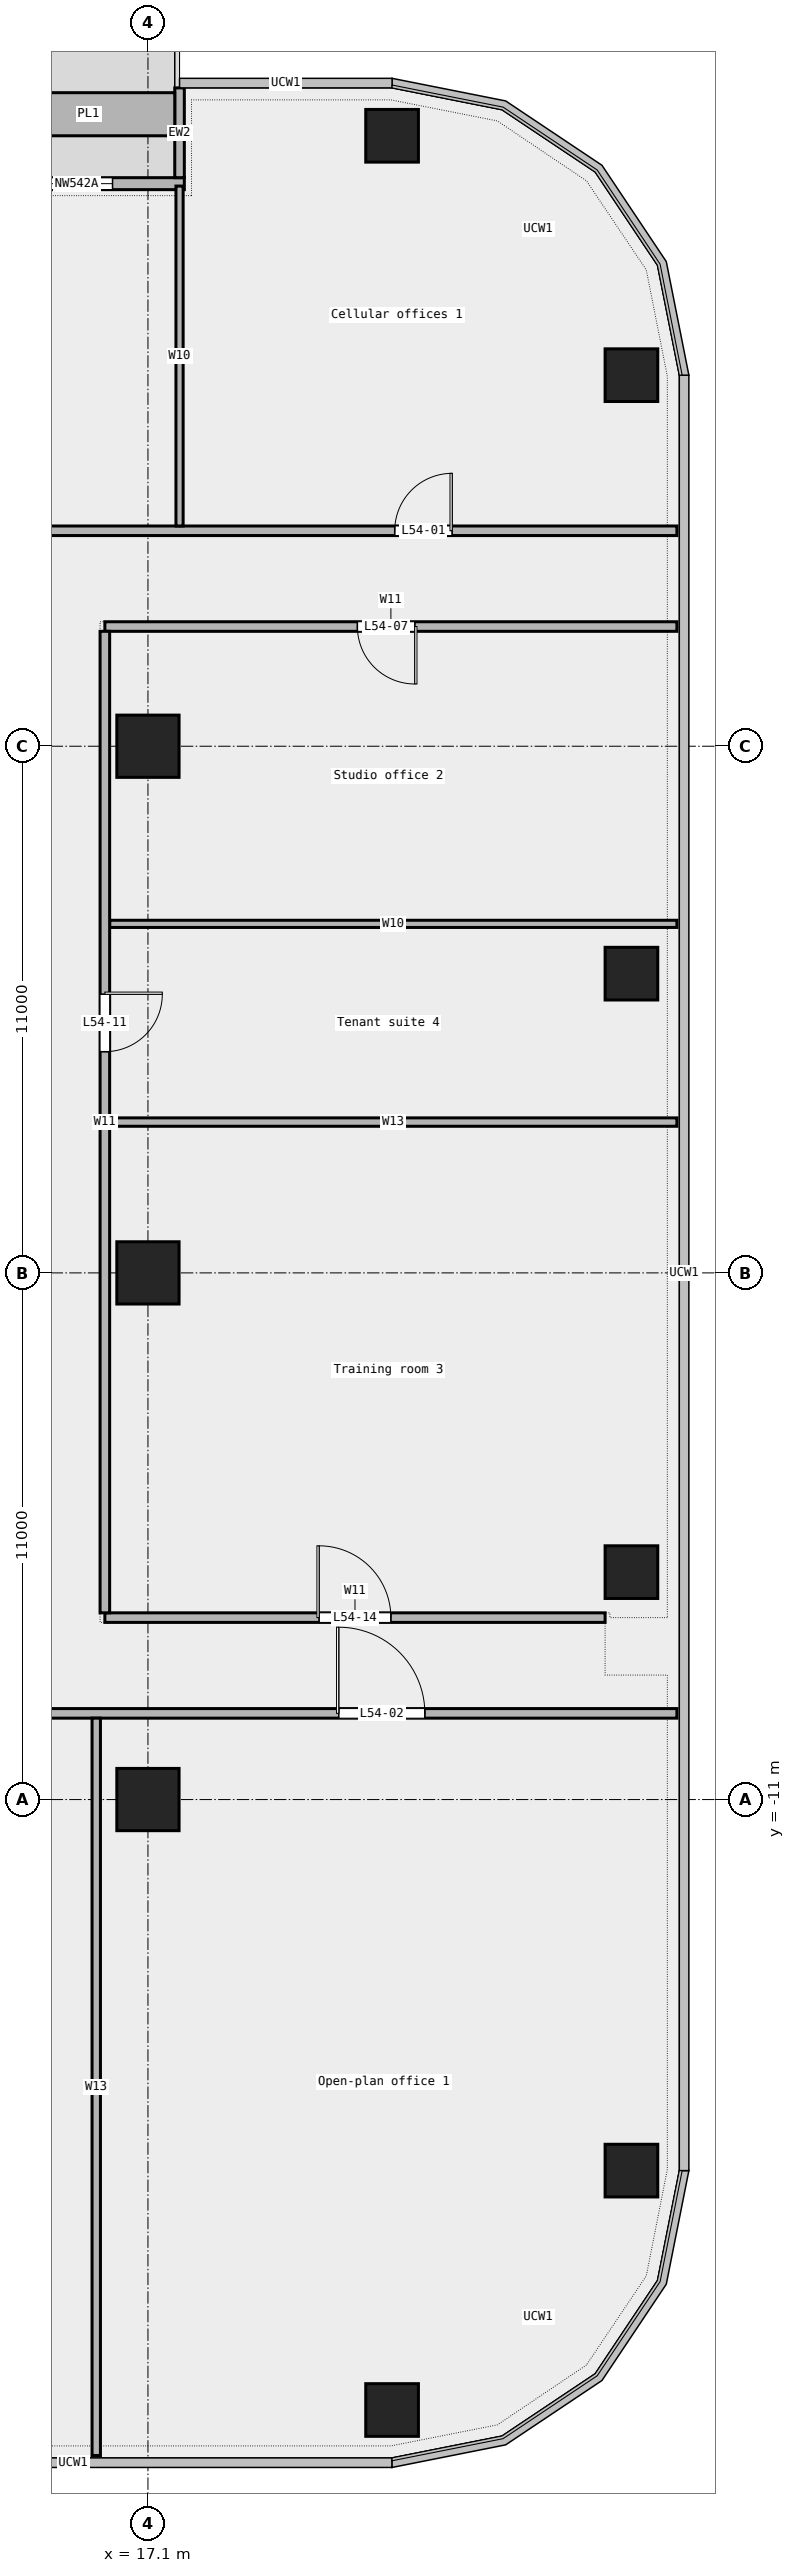
"""IFC4 building model, lengths in metres.
Left out: names, types, materials, properties, quantities, classifications, styles, units other than length and angle.
Written with IfcOpenShell. Run it as: python <this file> out.ifc"""

import sys

from ifc_helpers import new_model, si_unit, direction, frame, frame_2d, origin, origin_2d, place, context, subcontext, project, spatial, rectangle, extrude, element, fill, save


model = new_model("IFC4")
c1 = context("Model", 3, precision=1e-05, world=origin(), true_north=direction((0.0, 1.0)))
c2 = subcontext(c1, "Body", "Model", "MODEL_VIEW")
j1 = project(units=[si_unit("LENGTHUNIT", "METRE"), si_unit("PLANEANGLEUNIT", "RADIAN")], contexts=[c1])
p1 = place(None, origin())
s1 = spatial("IfcSite", under=j1, at=p1, CompositionType="ELEMENT")
p2 = place(p1, origin())
s2 = spatial("IfcBuilding", under=s1, at=p2, CompositionType="ELEMENT")
p3 = place(p2, frame((0.0, 0.0, 251.0)))
s3 = spatial("IfcBuildingStorey", under=s2, at=p3, CompositionType="ELEMENT", Elevation=251.0)
for number, where, z_axis, x_axis in (
    (1, (22.2, -23.75, 0.0), (0.0, 0.0, 1.0), (1.0, 0.0, 0.0)),
    (2, (27.2, -18.75, 0.0), (0.0, 0.0, 1.0), (1.0, 0.0, 0.0)),
    (3, (27.2, -6.25, 0.0), (0.0, 0.0, 1.0), (1.0, 0.0, 0.0)),
    (4, (27.2, 6.25, 0.0), (0.0, 0.0, 1.0), (1.0, 0.0, 0.0)),
    (5, (27.2, 18.75, 0.0), (0.0, 0.0, 1.0), (1.0, 0.0, 0.0)),
    (6, (22.2, 23.75, 0.0), (0.0, 0.0, 1.0), (1.0, 0.0, 0.0)),
):
    element("IfcColumn", number, at=place(p3, frame(where, z_axis=z_axis, x_axis=x_axis)), inside=s3, PredefinedType="COLUMN", context=c2, shape_type="SweptSolid", body=[
        extrude(rectangle(XDim=1.1, YDim=1.1, at=origin_2d()), origin(), (0.0, 0.0, 1.0), 3.6),
    ])
for number, where, z_axis, x_axis in (
    (7, (17.1, -11.0, 0.0), (0.0, 0.0, 1.0), (1.0, 0.0, 0.0)),
    (8, (17.1, 0.0, 0.0), (0.0, 0.0, 1.0), (1.0, 0.0, 0.0)),
    (9, (17.1, 11.0, 0.0), (0.0, 0.0, 1.0), (1.0, 0.0, 0.0)),
):
    element("IfcColumn", number, at=place(p3, frame(where, z_axis=z_axis, x_axis=x_axis)), inside=s3, PredefinedType="COLUMN", context=c2, shape_type="SweptSolid", body=[
        extrude(rectangle(XDim=1.3, YDim=1.3, at=origin_2d()), origin(), (0.0, 0.0, 1.0), 3.6),
    ])
p4 = place(p3, frame((17.86, 22.75, 0.0), z_axis=(0.0, 0.0, 1.0), x_axis=(-1.0, 0.0, 0.0)))
e10 = element("IfcWall", 10, at=p4, inside=s3, PredefinedType="STANDARD", context=c2, shape_type="SweptSolid", body=[
    extrude(rectangle(XDim=13.52, YDim=0.25, at=frame_2d((6.76, 0.0))), origin(), (0.0, 0.0, 1.0), 3.6),
])
p5 = place(p4, frame((1.5, 0.0, 0.45)))
e11 = element("IfcOpeningElement", 11, at=p5, cuts=e10, PredefinedType="OPENING", context=c2, shape_type="SweptSolid", body=[
    extrude(rectangle(XDim=1.5, YDim=2.4, at=frame_2d((0.75, 1.2))), frame((0.0, 0.137, 0.0), z_axis=(0.0, -1.0, 0.0), x_axis=(1.0, 0.0, 0.0)), (0.0, 0.0, 1.0), 0.274),
])
p6 = place(p4, frame((4.0, 0.0, 0.0)))
e12 = element("IfcOpeningElement", 12, at=p6, cuts=e10, PredefinedType="OPENING", context=c2, shape_type="SweptSolid", body=[
    extrude(rectangle(XDim=1.8, YDim=2.4, at=frame_2d((0.9, 1.2))), frame((0.0, 0.137, 0.0), z_axis=(0.0, -1.0, 0.0), x_axis=(1.0, 0.0, 0.0)), (0.0, 0.0, 1.0), 0.274),
])
p7 = place(p4, frame((10.5, 0.0, 0.45)))
e13 = element("IfcOpeningElement", 13, at=p7, cuts=e10, PredefinedType="OPENING", context=c2, shape_type="SweptSolid", body=[
    extrude(rectangle(XDim=1.5, YDim=2.4, at=frame_2d((0.75, 1.2))), frame((0.0, 0.137, 0.0), z_axis=(0.0, -1.0, 0.0), x_axis=(1.0, 0.0, 0.0)), (0.0, 0.0, 1.0), 0.274),
])
p8 = place(p3, frame((17.76, 24.75, 0.0), z_axis=(0.0, 0.0, 1.0), x_axis=(0.0, -1.0, 0.0)))
e14 = element("IfcWall", 14, at=p8, inside=s3, PredefinedType="STANDARD", context=c2, shape_type="SweptSolid", body=[
    extrude(rectangle(XDim=1.875, YDim=0.2, at=frame_2d((0.938, 0.0))), origin(), (0.0, 0.0, 1.0), 3.6),
])
p9 = place(p3, frame((17.66, 24.2, 0.0), z_axis=(0.0, 0.0, 1.0), x_axis=(-1.0, 0.0, 0.0)))
e15 = element("IfcWall", 15, at=p9, inside=s3, PredefinedType="STANDARD", context=c2, shape_type="SweptSolid", body=[
    extrude(rectangle(XDim=3.6, YDim=0.9, at=frame_2d((1.8, 0.0))), origin(), (0.0, 0.0, 1.0), 0.7),
])
p10 = place(p3, frame((-4.44, -9.2, 0.0), z_axis=(0.0, 0.0, 1.0), x_axis=(1.0, 0.0, 0.0)))
e16 = element("IfcWall", 16, at=p10, inside=s3, PredefinedType="PARTITIONING", context=c2, shape_type="SweptSolid", body=[
    extrude(rectangle(XDim=32.59, YDim=0.2, at=frame_2d((16.295, 0.0))), origin(), (0.0, 0.0, 1.0), 3.6),
])
p11 = place(p10, frame((25.525, 0.0, 0.0)))
e17 = element("IfcOpeningElement", 17, at=p11, cuts=e16, PredefinedType="OPENING", context=c2, shape_type="SweptSolid", body=[
    extrude(rectangle(XDim=1.8, YDim=2.1, at=frame_2d((0.9, 1.05))), frame((0.0, 0.112, 0.0), z_axis=(0.0, -1.0, 0.0), x_axis=(1.0, 0.0, 0.0)), (0.0, 0.0, 1.0), 0.224),
])
p12 = place(p10, frame((5.76, 0.0, 0.0)))
e18 = element("IfcOpeningElement", 18, at=p12, cuts=e16, PredefinedType="OPENING", context=c2, shape_type="SweptSolid", body=[
    extrude(rectangle(XDim=1.8, YDim=2.1, at=frame_2d((0.9, 1.05))), frame((0.0, 0.112, 0.0), z_axis=(0.0, -1.0, 0.0), x_axis=(1.0, 0.0, 0.0)), (0.0, 0.0, 1.0), 0.224),
])
p13 = place(p10, frame((16.14, 0.0, 0.0)))
e19 = element("IfcOpeningElement", 19, at=p13, cuts=e16, PredefinedType="OPENING", context=c2, shape_type="SweptSolid", body=[
    extrude(rectangle(XDim=1.5, YDim=2.1, at=frame_2d((0.75, 1.05))), frame((0.0, 0.112, 0.0), z_axis=(0.0, -1.0, 0.0), x_axis=(1.0, 0.0, 0.0)), (0.0, 0.0, 1.0), 0.224),
])
p14 = place(p3, frame((16.2, -7.2, 0.0), z_axis=(0.0, 0.0, 1.0), x_axis=(1.0, 0.0, 0.0)))
e20 = element("IfcWall", 20, at=p14, inside=s3, PredefinedType="PARTITIONING", context=c2, shape_type="SweptSolid", body=[
    extrude(rectangle(XDim=10.45, YDim=0.2, at=frame_2d((5.225, 0.0))), origin(), (0.0, 0.0, 1.0), 3.6),
])
p15 = place(p14, frame((4.475, 0.0, 0.0)))
e21 = element("IfcOpeningElement", 21, at=p15, cuts=e20, PredefinedType="OPENING", context=c2, shape_type="SweptSolid", body=[
    extrude(rectangle(XDim=1.5, YDim=2.1, at=frame_2d((0.75, 1.05))), frame((0.0, 0.112, 0.0), z_axis=(0.0, -1.0, 0.0), x_axis=(1.0, 0.0, 0.0)), (0.0, 0.0, 1.0), 0.224),
])
p16 = place(p3, frame((16.3, 3.15, 0.0), z_axis=(0.0, 0.0, 1.0), x_axis=(1.0, 0.0, 0.0)))
e22 = element("IfcWall", 22, at=p16, inside=s3, PredefinedType="PARTITIONING", context=c2, shape_type="SweptSolid", body=[
    extrude(rectangle(XDim=11.85, YDim=0.175, at=frame_2d((5.925, 0.0))), origin(), (0.0, 0.0, 1.0), 3.6),
])
p17 = place(p3, frame((16.3, 7.29, 0.0), z_axis=(0.0, 0.0, 1.0), x_axis=(1.0, 0.0, 0.0)))
e23 = element("IfcWall", 23, at=p17, inside=s3, PredefinedType="PARTITIONING", context=c2, shape_type="SweptSolid", body=[
    extrude(rectangle(XDim=11.85, YDim=0.15, at=frame_2d((5.925, 0.0))), origin(), (0.0, 0.0, 1.0), 3.6),
])
p18 = place(p3, frame((16.2, 13.5, 0.0), z_axis=(0.0, 0.0, 1.0), x_axis=(1.0, 0.0, 0.0)))
e24 = element("IfcWall", 24, at=p18, inside=s3, PredefinedType="PARTITIONING", context=c2, shape_type="SweptSolid", body=[
    extrude(rectangle(XDim=11.95, YDim=0.2, at=frame_2d((5.975, 0.0))), origin(), (0.0, 0.0, 1.0), 3.6),
])
p19 = place(p18, frame((5.275, 0.0, 0.0)))
e25 = element("IfcOpeningElement", 25, at=p19, cuts=e24, PredefinedType="OPENING", context=c2, shape_type="SweptSolid", body=[
    extrude(rectangle(XDim=1.2, YDim=2.1, at=frame_2d((0.6, 1.05))), frame((0.0, 0.112, 0.0), z_axis=(0.0, -1.0, 0.0), x_axis=(1.0, 0.0, 0.0)), (0.0, 0.0, 1.0), 0.224),
])
p20 = place(p3, frame((-28.15, 15.5, 0.0), z_axis=(0.0, 0.0, 1.0), x_axis=(1.0, 0.0, 0.0)))
e26 = element("IfcWall", 26, at=p20, inside=s3, PredefinedType="PARTITIONING", context=c2, shape_type="SweptSolid", body=[
    extrude(rectangle(XDim=56.3, YDim=0.2, at=frame_2d((28.15, 0.0))), origin(), (0.0, 0.0, 1.0), 3.6),
])
p21 = place(p20, frame((50.405, 0.0, 0.0)))
e27 = element("IfcOpeningElement", 27, at=p21, cuts=e26, PredefinedType="OPENING", context=c2, shape_type="SweptSolid", body=[
    extrude(rectangle(XDim=1.2, YDim=2.1, at=frame_2d((0.6, 1.05))), frame((0.0, 0.112, 0.0), z_axis=(0.0, -1.0, 0.0), x_axis=(1.0, 0.0, 0.0)), (0.0, 0.0, 1.0), 0.224),
])
p22 = place(p20, frame((38.5, 0.0, 0.0)))
e28 = element("IfcOpeningElement", 28, at=p22, cuts=e26, PredefinedType="OPENING", context=c2, shape_type="SweptSolid", body=[
    extrude(rectangle(XDim=1.5, YDim=2.1, at=frame_2d((0.75, 1.05))), frame((0.0, 0.112, 0.0), z_axis=(0.0, -1.0, 0.0), x_axis=(1.0, 0.0, 0.0)), (0.0, 0.0, 1.0), 0.224),
])
p23 = place(p20, frame((30.853, 0.0, 0.0)))
e29 = element("IfcOpeningElement", 29, at=p23, cuts=e26, PredefinedType="OPENING", context=c2, shape_type="SweptSolid", body=[
    extrude(rectangle(XDim=0.9, YDim=2.1, at=frame_2d((0.45, 1.05))), frame((0.0, 0.112, 0.0), z_axis=(0.0, -1.0, 0.0), x_axis=(1.0, 0.0, 0.0)), (0.0, 0.0, 1.0), 0.224),
])
p24 = place(p20, frame((19.798, 0.0, 0.0)))
e30 = element("IfcOpeningElement", 30, at=p24, cuts=e26, PredefinedType="OPENING", context=c2, shape_type="SweptSolid", body=[
    extrude(rectangle(XDim=1.8, YDim=2.1, at=frame_2d((0.9, 1.05))), frame((0.0, 0.112, 0.0), z_axis=(0.0, -1.0, 0.0), x_axis=(1.0, 0.0, 0.0)), (0.0, 0.0, 1.0), 0.224),
])
p25 = place(p20, frame((5.04, 0.0, 0.0)))
e31 = element("IfcOpeningElement", 31, at=p25, cuts=e26, PredefinedType="OPENING", context=c2, shape_type="SweptSolid", body=[
    extrude(rectangle(XDim=1.5, YDim=2.1, at=frame_2d((0.75, 1.05))), frame((0.0, 0.112, 0.0), z_axis=(0.0, -1.0, 0.0), x_axis=(1.0, 0.0, 0.0)), (0.0, 0.0, 1.0), 0.224),
])
p26 = place(p3, frame((16.02, -24.7, 0.0), z_axis=(0.0, 0.0, 1.0), x_axis=(0.0, 1.0, 0.0)))
e32 = element("IfcWall", 32, at=p26, inside=s3, PredefinedType="PARTITIONING", context=c2, shape_type="SweptSolid", body=[
    extrude(rectangle(XDim=15.4, YDim=0.175, at=frame_2d((7.7, 0.0))), origin(), (0.0, 0.0, 1.0), 3.6),
])
p27 = place(p3, frame((16.2, -7.1, 0.0), z_axis=(0.0, 0.0, 1.0), x_axis=(0.0, 1.0, 0.0)))
e33 = element("IfcWall", 33, at=p27, inside=s3, PredefinedType="PARTITIONING", context=c2, shape_type="SweptSolid", body=[
    extrude(rectangle(XDim=20.5, YDim=0.2, at=frame_2d((10.25, 0.0))), origin(), (0.0, 0.0, 1.0), 3.6),
])
p28 = place(p27, frame((11.72, 0.0, 0.0)))
e34 = element("IfcOpeningElement", 34, at=p28, cuts=e33, PredefinedType="OPENING", context=c2, shape_type="SweptSolid", body=[
    extrude(rectangle(XDim=1.2, YDim=2.1, at=frame_2d((0.6, 1.05))), frame((0.0, 0.112, 0.0), z_axis=(0.0, -1.0, 0.0), x_axis=(1.0, 0.0, 0.0)), (0.0, 0.0, 1.0), 0.224),
])
p29 = place(p3, frame((17.76, 15.6, 0.0), z_axis=(0.0, 0.0, 1.0), x_axis=(0.0, 1.0, 0.0)))
e35 = element("IfcWall", 35, at=p29, inside=s3, PredefinedType="PARTITIONING", context=c2, shape_type="SweptSolid", body=[
    extrude(rectangle(XDim=7.1, YDim=0.15, at=frame_2d((3.55, 0.0))), origin(), (0.0, 0.0, 1.0), 3.6),
])
p30 = place(p5, origin())
e36 = element("IfcWindow", 36, at=p30, inside=s3, PartitioningType="SINGLE_PANEL", PredefinedType="WINDOW", context=c2, shape_type="SweptSolid", body=[
    extrude(rectangle(XDim=1.5, YDim=2.4, at=frame_2d((0.75, 1.2))), frame((0.0, 0.03, 0.0), z_axis=(0.0, -1.0, 0.0), x_axis=(1.0, 0.0, 0.0)), (0.0, 0.0, 1.0), 0.06),
])
fill(e11, e36)
p31 = place(p21, origin())
e37 = element("IfcDoor", 37, at=p31, inside=s3, OperationType="SINGLE_SWING_RIGHT", PredefinedType="DOOR", context=c2, shape_type="SweptSolid", body=[
    extrude(rectangle(XDim=1.2, YDim=2.1, at=frame_2d((0.6, 1.05))), frame((0.0, 0.025, 0.0), z_axis=(0.0, -1.0, 0.0), x_axis=(1.0, 0.0, 0.0)), (0.0, 0.0, 1.0), 0.05),
])
fill(e27, e37)
p32 = place(p11, origin())
e38 = element("IfcDoor", 38, at=p32, inside=s3, OperationType="DOUBLE_DOOR_SINGLE_SWING", PredefinedType="DOOR", context=c2, shape_type="SweptSolid", body=[
    extrude(rectangle(XDim=1.8, YDim=2.1, at=frame_2d((0.9, 1.05))), frame((0.0, 0.025, 0.0), z_axis=(0.0, -1.0, 0.0), x_axis=(1.0, 0.0, 0.0)), (0.0, 0.0, 1.0), 0.05),
])
fill(e17, e38)
p33 = place(p19, origin())
e39 = element("IfcDoor", 39, at=p33, inside=s3, OperationType="SINGLE_SWING_LEFT", PredefinedType="DOOR", context=c2, shape_type="SweptSolid", body=[
    extrude(rectangle(XDim=1.2, YDim=2.1, at=frame_2d((0.6, 1.05))), frame((0.0, 0.025, 0.0), z_axis=(0.0, -1.0, 0.0), x_axis=(1.0, 0.0, 0.0)), (0.0, 0.0, 1.0), 0.05),
])
fill(e25, e39)
p34 = place(p28, origin())
e40 = element("IfcDoor", 40, at=p34, inside=s3, OperationType="SINGLE_SWING_LEFT", PredefinedType="DOOR", context=c2, shape_type="SweptSolid", body=[
    extrude(rectangle(XDim=1.2, YDim=2.1, at=frame_2d((0.6, 1.05))), frame((0.0, 0.025, 0.0), z_axis=(0.0, -1.0, 0.0), x_axis=(1.0, 0.0, 0.0)), (0.0, 0.0, 1.0), 0.05),
])
fill(e34, e40)
p35 = place(p15, origin())
e41 = element("IfcDoor", 41, at=p35, inside=s3, OperationType="DOUBLE_DOOR_SINGLE_SWING", PredefinedType="DOOR", context=c2, shape_type="SweptSolid", body=[
    extrude(rectangle(XDim=1.5, YDim=2.1, at=frame_2d((0.75, 1.05))), frame((0.0, 0.025, 0.0), z_axis=(0.0, -1.0, 0.0), x_axis=(1.0, 0.0, 0.0)), (0.0, 0.0, 1.0), 0.05),
])
fill(e21, e41)
save(model, sys.argv[1])
